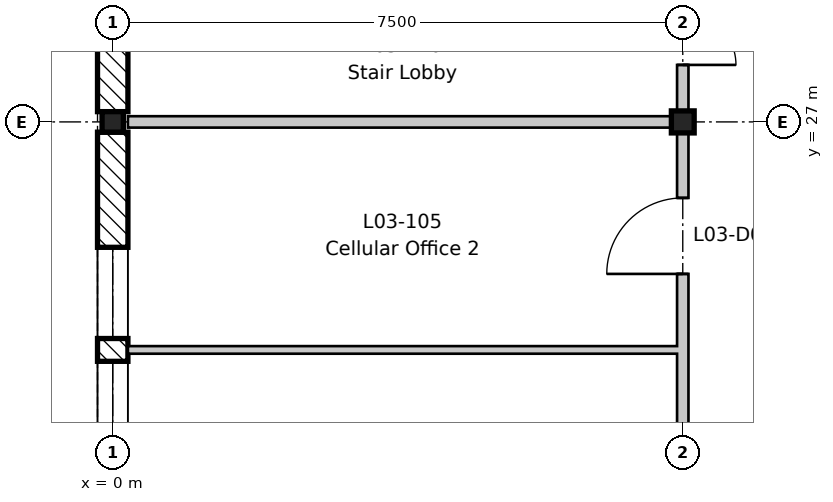
"""IFC4 building model, lengths in metres.
Left out: names, types, materials, properties, quantities, classifications, styles, units other than length and angle.
Written with IfcOpenShell. Run it as: python <this file> out.ifc"""

import sys

from ifc_helpers import new_model, si_unit, direction, frame, frame_2d, origin, origin_2d, place, context, subcontext, project, spatial, rectangle, i_section, extrude, element, fill, save


model = new_model("IFC4")
c1 = context("Model", 3, precision=1e-05, world=origin(), true_north=direction((0.0, 1.0)))
c2 = subcontext(c1, "Body", "Model", "MODEL_VIEW")
j1 = project(units=[si_unit("LENGTHUNIT", "METRE"), si_unit("PLANEANGLEUNIT", "RADIAN")], contexts=[c1])
p1 = place(None, origin())
s1 = spatial("IfcSite", under=j1, at=p1, CompositionType="ELEMENT")
p2 = place(p1, origin())
s2 = spatial("IfcBuilding", under=s1, at=p2, CompositionType="ELEMENT")
p3 = place(p2, frame((0.0, 0.0, 14.4)))
s3 = spatial("IfcBuildingStorey", under=s2, at=p3, CompositionType="ELEMENT", Elevation=14.4)
p4 = place(p3, frame((0.0, 27.0, -0.2), z_axis=(0.0, 0.0, 1.0), x_axis=(1.0, 0.0, 0.0)))
e1 = element("IfcColumn", 1, at=p4, inside=s3, PredefinedType="COLUMN", context=c2, shape_type="SweptSolid", body=[
    extrude(i_section(OverallWidth=0.28, OverallDepth=0.27, WebThickness=0.008, FlangeThickness=0.013, FilletRadius=0.024, at=origin_2d()), origin(), (0.0, 0.0, 1.0), 4.2),
])
p5 = place(p3, frame((7.5, 27.0, -0.2), z_axis=(0.0, 0.0, 1.0), x_axis=(1.0, 0.0, 0.0)))
e2 = element("IfcColumn", 2, at=p5, inside=s3, PredefinedType="COLUMN", context=c2, shape_type="SweptSolid", body=[
    extrude(i_section(OverallWidth=0.3, OverallDepth=0.29, WebThickness=0.009, FlangeThickness=0.014, FilletRadius=0.027, at=origin_2d()), origin(), (0.0, 0.0, 1.0), 4.2),
])
p6 = place(p3, frame((0.0, 18.135, 0.0), z_axis=(0.0, 0.0, 1.0), x_axis=(0.0, 1.0, 0.0)))
e3 = element("IfcWall", 3, at=p6, inside=s3, PredefinedType="STANDARD", context=c2, shape_type="SweptSolid", body=[
    extrude(rectangle(XDim=8.73, YDim=0.4, at=frame_2d((4.365, 0.0))), origin(), (0.0, 0.0, 1.0), 3.6),
])
p7 = place(p6, frame((1.515, 0.0, 0.6)))
e4 = element("IfcOpeningElement", 4, at=p7, cuts=e3, PredefinedType="OPENING", context=c2, shape_type="SweptSolid", body=[
    extrude(rectangle(XDim=1.2, YDim=2.7, at=frame_2d((0.6, 1.35))), frame((0.0, 0.21, 0.0), z_axis=(0.0, -1.0, 0.0), x_axis=(1.0, 0.0, 0.0)), (0.0, 0.0, 1.0), 0.42),
])
p8 = place(p6, frame((3.015, 0.0, 0.6)))
e5 = element("IfcOpeningElement", 5, at=p8, cuts=e3, PredefinedType="OPENING", context=c2, shape_type="SweptSolid", body=[
    extrude(rectangle(XDim=1.2, YDim=2.7, at=frame_2d((0.6, 1.35))), frame((0.0, 0.21, 0.0), z_axis=(0.0, -1.0, 0.0), x_axis=(1.0, 0.0, 0.0)), (0.0, 0.0, 1.0), 0.42),
])
p9 = place(p6, frame((4.515, 0.0, 0.6)))
e6 = element("IfcOpeningElement", 6, at=p9, cuts=e3, PredefinedType="OPENING", context=c2, shape_type="SweptSolid", body=[
    extrude(rectangle(XDim=1.2, YDim=2.7, at=frame_2d((0.6, 1.35))), frame((0.0, 0.21, 0.0), z_axis=(0.0, -1.0, 0.0), x_axis=(1.0, 0.0, 0.0)), (0.0, 0.0, 1.0), 0.42),
])
p10 = place(p6, frame((6.015, 0.0, 0.6)))
e7 = element("IfcOpeningElement", 7, at=p10, cuts=e3, PredefinedType="OPENING", context=c2, shape_type="SweptSolid", body=[
    extrude(rectangle(XDim=1.2, YDim=2.7, at=frame_2d((0.6, 1.35))), frame((0.0, 0.21, 0.0), z_axis=(0.0, -1.0, 0.0), x_axis=(1.0, 0.0, 0.0)), (0.0, 0.0, 1.0), 0.42),
])
p11 = place(p3, frame((0.0, 27.135, 0.0), z_axis=(0.0, 0.0, 1.0), x_axis=(0.0, 1.0, 0.0)))
e8 = element("IfcWall", 8, at=p11, inside=s3, PredefinedType="STANDARD", context=c2, shape_type="SweptSolid", body=[
    extrude(rectangle(XDim=8.73, YDim=0.4, at=frame_2d((4.365, 0.0))), origin(), (0.0, 0.0, 1.0), 3.6),
])
p12 = place(p3, frame((0.2, 24.0, 0.0), z_axis=(0.0, 0.0, 1.0), x_axis=(1.0, 0.0, 0.0)))
e9 = element("IfcWall", 9, at=p12, inside=s3, PredefinedType="PARTITIONING", context=c2, shape_type="SweptSolid", body=[
    extrude(rectangle(XDim=7.225, YDim=0.1, at=frame_2d((3.613, 0.0))), origin(), (0.0, 0.0, 1.0), 4.0),
])
p13 = place(p3, frame((0.2, 27.0, 0.0), z_axis=(0.0, 0.0, 1.0), x_axis=(1.0, 0.0, 0.0)))
e10 = element("IfcWall", 10, at=p13, inside=s3, PredefinedType="PARTITIONING", context=c2, shape_type="SweptSolid", body=[
    extrude(rectangle(XDim=7.225, YDim=0.15, at=frame_2d((3.613, 0.0))), origin(), (0.0, 0.0, 1.0), 3.65),
])
p14 = place(p3, frame((7.5, -8.8, 0.0), z_axis=(0.0, 0.0, 1.0), x_axis=(0.0, 1.0, 0.0)))
e11 = element("IfcWall", 11, at=p14, inside=s3, PredefinedType="PARTITIONING", context=c2, shape_type="SweptSolid", body=[
    extrude(rectangle(XDim=79.3, YDim=0.15, at=frame_2d((39.65, 0.0))), origin(), (0.0, 0.0, 1.0), 3.48),
])
p15 = place(p14, frame((18.8, 0.0, 0.0)))
e12 = element("IfcOpeningElement", 12, at=p15, cuts=e11, PredefinedType="OPENING", context=c2, shape_type="SweptSolid", body=[
    extrude(rectangle(XDim=1.0, YDim=2.1, at=frame_2d((0.5, 1.05))), frame((0.0, 0.085, 0.0), z_axis=(0.0, -1.0, 0.0), x_axis=(1.0, 0.0, 0.0)), (0.0, 0.0, 1.0), 0.17),
])
p16 = place(p14, frame((23.3, 0.0, 0.0)))
e13 = element("IfcOpeningElement", 13, at=p16, cuts=e11, PredefinedType="OPENING", context=c2, shape_type="SweptSolid", body=[
    extrude(rectangle(XDim=1.0, YDim=2.1, at=frame_2d((0.5, 1.05))), frame((0.0, 0.085, 0.0), z_axis=(0.0, -1.0, 0.0), x_axis=(1.0, 0.0, 0.0)), (0.0, 0.0, 1.0), 0.17),
])
p17 = place(p14, frame((27.8, 0.0, 0.0)))
e14 = element("IfcOpeningElement", 14, at=p17, cuts=e11, PredefinedType="OPENING", context=c2, shape_type="SweptSolid", body=[
    extrude(rectangle(XDim=1.0, YDim=2.1, at=frame_2d((0.5, 1.05))), frame((0.0, 0.085, 0.0), z_axis=(0.0, -1.0, 0.0), x_axis=(1.0, 0.0, 0.0)), (0.0, 0.0, 1.0), 0.17),
])
p18 = place(p14, frame((30.8, 0.0, 0.0)))
e15 = element("IfcOpeningElement", 15, at=p18, cuts=e11, PredefinedType="OPENING", context=c2, shape_type="SweptSolid", body=[
    extrude(rectangle(XDim=1.0, YDim=2.1, at=frame_2d((0.5, 1.05))), frame((0.0, 0.085, 0.0), z_axis=(0.0, -1.0, 0.0), x_axis=(1.0, 0.0, 0.0)), (0.0, 0.0, 1.0), 0.17),
])
p19 = place(p14, frame((33.8, 0.0, 0.0)))
e16 = element("IfcOpeningElement", 16, at=p19, cuts=e11, PredefinedType="OPENING", context=c2, shape_type="SweptSolid", body=[
    extrude(rectangle(XDim=1.0, YDim=2.1, at=frame_2d((0.5, 1.05))), frame((0.0, 0.085, 0.0), z_axis=(0.0, -1.0, 0.0), x_axis=(1.0, 0.0, 0.0)), (0.0, 0.0, 1.0), 0.17),
])
p20 = place(p14, frame((47.3, 0.0, 0.0)))
e17 = element("IfcOpeningElement", 17, at=p20, cuts=e11, PredefinedType="OPENING", context=c2, shape_type="SweptSolid", body=[
    extrude(rectangle(XDim=1.0, YDim=2.1, at=frame_2d((0.5, 1.05))), frame((0.0, 0.085, 0.0), z_axis=(0.0, -1.0, 0.0), x_axis=(1.0, 0.0, 0.0)), (0.0, 0.0, 1.0), 0.17),
])
p21 = place(p14, frame((51.8, 0.0, 0.0)))
e18 = element("IfcOpeningElement", 18, at=p21, cuts=e11, PredefinedType="OPENING", context=c2, shape_type="SweptSolid", body=[
    extrude(rectangle(XDim=1.0, YDim=2.1, at=frame_2d((0.5, 1.05))), frame((0.0, 0.085, 0.0), z_axis=(0.0, -1.0, 0.0), x_axis=(1.0, 0.0, 0.0)), (0.0, 0.0, 1.0), 0.17),
])
p22 = place(p14, frame((54.8, 0.0, 0.0)))
e19 = element("IfcOpeningElement", 19, at=p22, cuts=e11, PredefinedType="OPENING", context=c2, shape_type="SweptSolid", body=[
    extrude(rectangle(XDim=1.0, YDim=2.1, at=frame_2d((0.5, 1.05))), frame((0.0, 0.085, 0.0), z_axis=(0.0, -1.0, 0.0), x_axis=(1.0, 0.0, 0.0)), (0.0, 0.0, 1.0), 0.17),
])
p23 = place(p14, frame((57.8, 0.0, 0.0)))
e20 = element("IfcOpeningElement", 20, at=p23, cuts=e11, PredefinedType="OPENING", context=c2, shape_type="SweptSolid", body=[
    extrude(rectangle(XDim=1.0, YDim=2.1, at=frame_2d((0.5, 1.05))), frame((0.0, 0.085, 0.0), z_axis=(0.0, -1.0, 0.0), x_axis=(1.0, 0.0, 0.0)), (0.0, 0.0, 1.0), 0.17),
])
p24 = place(p14, frame((60.8, 0.0, 0.0)))
e21 = element("IfcOpeningElement", 21, at=p24, cuts=e11, PredefinedType="OPENING", context=c2, shape_type="SweptSolid", body=[
    extrude(rectangle(XDim=1.0, YDim=2.1, at=frame_2d((0.5, 1.05))), frame((0.0, 0.085, 0.0), z_axis=(0.0, -1.0, 0.0), x_axis=(1.0, 0.0, 0.0)), (0.0, 0.0, 1.0), 0.17),
])
p25 = place(p14, frame((12.6, 0.0, 0.0)))
e22 = element("IfcOpeningElement", 22, at=p25, cuts=e11, PredefinedType="OPENING", context=c2, shape_type="SweptSolid", body=[
    extrude(rectangle(XDim=1.4, YDim=2.1, at=frame_2d((0.7, 1.05))), frame((0.0, 0.085, 0.0), z_axis=(0.0, -1.0, 0.0), x_axis=(1.0, 0.0, 0.0)), (0.0, 0.0, 1.0), 0.17),
])
p26 = place(p14, frame((3.6, 0.0, 0.0)))
e23 = element("IfcOpeningElement", 23, at=p26, cuts=e11, PredefinedType="OPENING", context=c2, shape_type="SweptSolid", body=[
    extrude(rectangle(XDim=1.4, YDim=2.1, at=frame_2d((0.7, 1.05))), frame((0.0, 0.085, 0.0), z_axis=(0.0, -1.0, 0.0), x_axis=(1.0, 0.0, 0.0)), (0.0, 0.0, 1.0), 0.17),
])
p27 = place(p14, frame((63.55, 0.0, 0.0)))
e24 = element("IfcOpeningElement", 24, at=p27, cuts=e11, PredefinedType="OPENING", context=c2, shape_type="SweptSolid", body=[
    extrude(rectangle(XDim=1.4, YDim=2.1, at=frame_2d((0.7, 1.05))), frame((0.0, 0.085, 0.0), z_axis=(0.0, -1.0, 0.0), x_axis=(1.0, 0.0, 0.0)), (0.0, 0.0, 1.0), 0.17),
])
p28 = place(p14, frame((69.6, 0.0, 0.0)))
e25 = element("IfcOpeningElement", 25, at=p28, cuts=e11, PredefinedType="OPENING", context=c2, shape_type="SweptSolid", body=[
    extrude(rectangle(XDim=1.4, YDim=2.1, at=frame_2d((0.7, 1.05))), frame((0.0, 0.085, 0.0), z_axis=(0.0, -1.0, 0.0), x_axis=(1.0, 0.0, 0.0)), (0.0, 0.0, 1.0), 0.17),
])
p29 = place(p14, frame((42.85, 0.0, 0.0)))
e26 = element("IfcOpeningElement", 26, at=p29, cuts=e11, PredefinedType="OPENING", context=c2, shape_type="SweptSolid", body=[
    extrude(rectangle(XDim=1.0, YDim=2.1, at=frame_2d((0.5, 1.05))), frame((0.0, 0.085, 0.0), z_axis=(0.0, -1.0, 0.0), x_axis=(1.0, 0.0, 0.0)), (0.0, 0.0, 1.0), 0.17),
])
p30 = place(p14, frame((36.55, 0.0, 0.0)))
e27 = element("IfcOpeningElement", 27, at=p30, cuts=e11, PredefinedType="OPENING", context=c2, shape_type="SweptSolid", body=[
    extrude(rectangle(XDim=1.4, YDim=2.1, at=frame_2d((0.7, 1.05))), frame((0.0, 0.085, 0.0), z_axis=(0.0, -1.0, 0.0), x_axis=(1.0, 0.0, 0.0)), (0.0, 0.0, 1.0), 0.17),
])
p31 = place(p14, frame((72.8, 0.0, 0.0)))
e28 = element("IfcOpeningElement", 28, at=p31, cuts=e11, PredefinedType="OPENING", context=c2, shape_type="SweptSolid", body=[
    extrude(rectangle(XDim=1.0, YDim=2.1, at=frame_2d((0.5, 1.05))), frame((0.0, 0.085, 0.0), z_axis=(0.0, -1.0, 0.0), x_axis=(1.0, 0.0, 0.0)), (0.0, 0.0, 1.0), 0.17),
])
p32 = place(p9, origin())
e29 = element("IfcWindow", 29, at=p32, inside=s3, PartitioningType="SINGLE_PANEL", PredefinedType="WINDOW", context=c2, shape_type="SweptSolid", body=[
    extrude(rectangle(XDim=1.2, YDim=2.7, at=frame_2d((0.6, 1.35))), frame((0.0, 0.03, 0.0), z_axis=(0.0, -1.0, 0.0), x_axis=(1.0, 0.0, 0.0)), (0.0, 0.0, 1.0), 0.06),
])
fill(e6, e29)
p33 = place(p10, origin())
e30 = element("IfcWindow", 30, at=p33, inside=s3, PartitioningType="SINGLE_PANEL", PredefinedType="WINDOW", context=c2, shape_type="SweptSolid", body=[
    extrude(rectangle(XDim=1.2, YDim=2.7, at=frame_2d((0.6, 1.35))), frame((0.0, 0.03, 0.0), z_axis=(0.0, -1.0, 0.0), x_axis=(1.0, 0.0, 0.0)), (0.0, 0.0, 1.0), 0.06),
])
fill(e7, e30)
p34 = place(p19, origin())
e31 = element("IfcDoor", 31, at=p34, inside=s3, OperationType="SINGLE_SWING_LEFT", PredefinedType="DOOR", context=c2, shape_type="SweptSolid", body=[
    extrude(rectangle(XDim=1.0, YDim=2.1, at=frame_2d((0.5, 1.05))), frame((0.0, 0.025, 0.0), z_axis=(0.0, -1.0, 0.0), x_axis=(1.0, 0.0, 0.0)), (0.0, 0.0, 1.0), 0.05),
])
fill(e16, e31)
p35 = place(p30, frame((1.4, 0.0, 0.0), z_axis=(0.0, 0.0, 1.0), x_axis=(-1.0, 0.0, 0.0)))
e32 = element("IfcDoor", 32, at=p35, inside=s3, OperationType="DOUBLE_DOOR_SINGLE_SWING", PredefinedType="DOOR", context=c2, shape_type="SweptSolid", body=[
    extrude(rectangle(XDim=1.4, YDim=2.1, at=frame_2d((0.7, 1.05))), frame((0.0, 0.025, 0.0), z_axis=(0.0, -1.0, 0.0), x_axis=(1.0, 0.0, 0.0)), (0.0, 0.0, 1.0), 0.05),
])
fill(e27, e32)
save(model, sys.argv[1])
